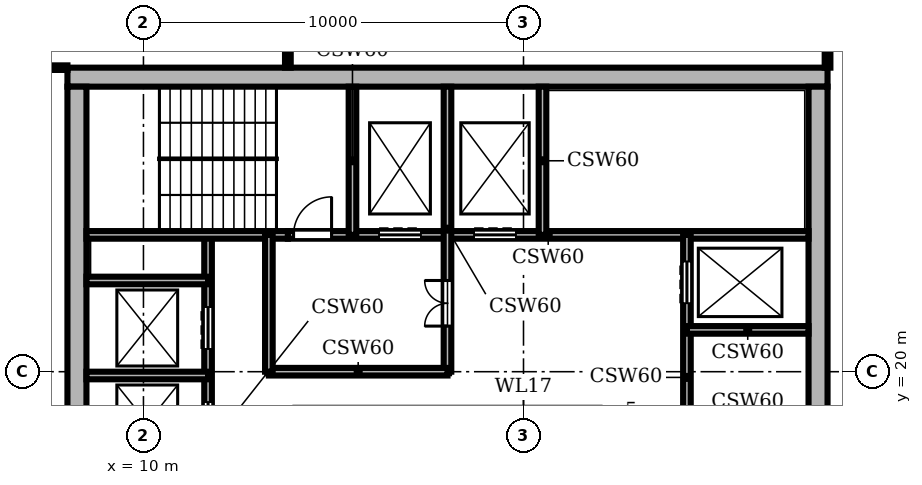
"""IFC4 building model, lengths in metres.
Left out: names, types, materials, properties, quantities, classifications, styles, units other than length and angle.
Written with IfcOpenShell. Run it as: python <this file> out.ifc"""

import sys

from ifc_helpers import new_model, si_unit, direction, frame, frame_2d, origin, place, context, subcontext, project, spatial, rectangle, extrude, element, fill, save


model = new_model("IFC4")
c1 = context("Model", 3, precision=1e-05, world=origin(), true_north=direction((0.0, 1.0)))
c2 = subcontext(c1, "Body", "Model", "MODEL_VIEW")
j1 = project(units=[si_unit("LENGTHUNIT", "METRE"), si_unit("PLANEANGLEUNIT", "RADIAN")], contexts=[c1])
p1 = place(None, origin())
s1 = spatial("IfcSite", under=j1, at=p1, CompositionType="ELEMENT")
p2 = place(p1, origin())
s2 = spatial("IfcBuilding", under=s1, at=p2, CompositionType="ELEMENT")
p3 = place(p2, frame((0.0, 0.0, 317.7)))
s3 = spatial("IfcBuildingStorey", under=s2, at=p3, CompositionType="ELEMENT", Elevation=317.7)
p4 = place(p3, frame((27.75, 8.5, 0.0), z_axis=(0.0, 0.0, 1.0), x_axis=(0.0, 1.0, 0.0)))
e1 = element("IfcWall", 1, at=p4, inside=s3, PredefinedType="SHEAR", context=c2, shape_type="SweptSolid", body=[
    extrude(rectangle(XDim=19.0, YDim=0.5, at=frame_2d((9.5, 0.0))), origin(), (0.0, 0.0, 1.0), 3.9),
])
p5 = place(p4, frame((4.95, 0.0, 0.0)))
e2 = element("IfcOpeningElement", 2, at=p5, cuts=e1, PredefinedType="OPENING", context=c2, shape_type="SweptSolid", body=[
    extrude(rectangle(XDim=1.6, YDim=2.1, at=frame_2d((0.8, 1.05))), frame((0.0, 0.26, 0.0), z_axis=(0.0, -1.0, 0.0), x_axis=(1.0, 0.0, 0.0)), (0.0, 0.0, 1.0), 0.52),
])
p6 = place(p3, frame((28.0, 27.75, 0.0), z_axis=(0.0, 0.0, 1.0), x_axis=(-1.0, 0.0, 0.0)))
e3 = element("IfcWall", 3, at=p6, inside=s3, PredefinedType="SHEAR", context=c2, shape_type="SweptSolid", body=[
    extrude(rectangle(XDim=20.0, YDim=0.5, at=frame_2d((10.0, 0.0))), origin(), (0.0, 0.0, 1.0), 3.9),
])
p7 = place(p3, frame((8.25, 27.5, 0.0), z_axis=(0.0, 0.0, 1.0), x_axis=(0.0, -1.0, 0.0)))
e4 = element("IfcWall", 4, at=p7, inside=s3, PredefinedType="SHEAR", context=c2, shape_type="SweptSolid", body=[
    extrude(rectangle(XDim=19.0, YDim=0.5, at=frame_2d((9.5, 0.0))), origin(), (0.0, 0.0, 1.0), 3.9),
])
p8 = place(p3, frame((8.5, 19.9, 0.0), z_axis=(0.0, 0.0, 1.0), x_axis=(1.0, 0.0, 0.0)))
e5 = element("IfcWall", 5, at=p8, inside=s3, PredefinedType="SHEAR", context=c2, shape_type="SweptSolid", body=[
    extrude(rectangle(XDim=3.2, YDim=0.2, at=frame_2d((1.6, 0.0))), origin(), (0.0, 0.0, 1.0), 3.58),
])
p9 = place(p3, frame((13.3, 20.0, 0.0), z_axis=(0.0, 0.0, 1.0), x_axis=(1.0, 0.0, 0.0)))
e6 = element("IfcWall", 6, at=p9, inside=s3, PredefinedType="SHEAR", context=c2, shape_type="SweptSolid", body=[
    extrude(rectangle(XDim=4.7, YDim=0.2, at=frame_2d((2.35, 0.0))), origin(), (0.0, 0.0, 1.0), 3.58),
])
for number, where, z_axis, x_axis in (
    (7, (24.3, 21.1, 0.0), (0.0, 0.0, 1.0), (1.0, 0.0, 0.0)),
    (8, (8.5, 22.4, 0.0), (0.0, 0.0, 1.0), (1.0, 0.0, 0.0)),
):
    element("IfcWall", number, at=place(p3, frame(where, z_axis=z_axis, x_axis=x_axis)), inside=s3, PredefinedType="SHEAR", context=c2, shape_type="SweptSolid", body=[
        extrude(rectangle(XDim=3.2, YDim=0.2, at=frame_2d((1.6, 0.0))), origin(), (0.0, 0.0, 1.0), 3.58),
    ])
p10 = place(p3, frame((8.5, 23.6, 0.0), z_axis=(0.0, 0.0, 1.0), x_axis=(1.0, 0.0, 0.0)))
e9 = element("IfcWall", 9, at=p10, inside=s3, PredefinedType="SHEAR", context=c2, shape_type="SweptSolid", body=[
    extrude(rectangle(XDim=5.3, YDim=0.2, at=frame_2d((2.65, 0.0))), origin(), (0.0, 0.0, 1.0), 3.58),
])
p11 = place(p3, frame((13.8, 23.6, 0.0), z_axis=(0.0, 0.0, 1.0), x_axis=(1.0, 0.0, 0.0)))
e10 = element("IfcWall", 10, at=p11, inside=s3, PredefinedType="SHEAR", context=c2, shape_type="SweptSolid", body=[
    extrude(rectangle(XDim=13.7, YDim=0.2, at=frame_2d((6.85, 0.0))), origin(), (0.0, 0.0, 1.0), 3.58),
])
p12 = place(p11, frame((2.4, 0.0, 0.0)))
e11 = element("IfcOpeningElement", 11, at=p12, cuts=e10, PredefinedType="OPENING", context=c2, shape_type="SweptSolid", body=[
    extrude(rectangle(XDim=1.1, YDim=2.1, at=frame_2d((0.55, 1.05))), frame((0.0, 0.11, 0.0), z_axis=(0.0, -1.0, 0.0), x_axis=(1.0, 0.0, 0.0)), (0.0, 0.0, 1.0), 0.22),
])
p13 = place(p11, frame((4.9, 0.0, 0.0)))
e12 = element("IfcOpeningElement", 12, at=p13, cuts=e10, PredefinedType="OPENING", context=c2, shape_type="SweptSolid", body=[
    extrude(rectangle(XDim=1.1, YDim=2.1, at=frame_2d((0.55, 1.05))), frame((0.0, 0.11, 0.0), z_axis=(0.0, -1.0, 0.0), x_axis=(1.0, 0.0, 0.0)), (0.0, 0.0, 1.0), 0.22),
])
p14 = place(p11, frame((0.15, 0.0, 0.0)))
e13 = element("IfcOpeningElement", 13, at=p14, cuts=e10, PredefinedType="OPENING", context=c2, shape_type="SweptSolid", body=[
    extrude(rectangle(XDim=1.0, YDim=2.1, at=frame_2d((0.5, 1.05))), frame((0.0, 0.11, 0.0), z_axis=(0.0, -1.0, 0.0), x_axis=(1.0, 0.0, 0.0)), (0.0, 0.0, 1.0), 0.22),
])
p15 = place(p3, frame((11.7, 12.4, 0.0), z_axis=(0.0, 0.0, 1.0), x_axis=(0.0, 1.0, 0.0)))
e14 = element("IfcWall", 14, at=p15, inside=s3, PredefinedType="SHEAR", context=c2, shape_type="SweptSolid", body=[
    extrude(rectangle(XDim=11.2, YDim=0.2, at=frame_2d((5.6, 0.0))), origin(), (0.0, 0.0, 1.0), 3.58),
])
p16 = place(p15, frame((0.7, 0.0, 0.0)))
e15 = element("IfcOpeningElement", 15, at=p16, cuts=e14, PredefinedType="OPENING", context=c2, shape_type="SweptSolid", body=[
    extrude(rectangle(XDim=1.1, YDim=2.1, at=frame_2d((0.55, 1.05))), frame((0.0, 0.11, 0.0), z_axis=(0.0, -1.0, 0.0), x_axis=(1.0, 0.0, 0.0)), (0.0, 0.0, 1.0), 0.22),
])
p17 = place(p15, frame((3.2, 0.0, 0.0)))
e16 = element("IfcOpeningElement", 16, at=p17, cuts=e14, PredefinedType="OPENING", context=c2, shape_type="SweptSolid", body=[
    extrude(rectangle(XDim=1.1, YDim=2.1, at=frame_2d((0.55, 1.05))), frame((0.0, 0.11, 0.0), z_axis=(0.0, -1.0, 0.0), x_axis=(1.0, 0.0, 0.0)), (0.0, 0.0, 1.0), 0.22),
])
p18 = place(p15, frame((5.7, 0.0, 0.0)))
e17 = element("IfcOpeningElement", 17, at=p18, cuts=e14, PredefinedType="OPENING", context=c2, shape_type="SweptSolid", body=[
    extrude(rectangle(XDim=1.1, YDim=2.1, at=frame_2d((0.55, 1.05))), frame((0.0, 0.11, 0.0), z_axis=(0.0, -1.0, 0.0), x_axis=(1.0, 0.0, 0.0)), (0.0, 0.0, 1.0), 0.22),
])
p19 = place(p15, frame((8.2, 0.0, 0.0)))
e18 = element("IfcOpeningElement", 18, at=p19, cuts=e14, PredefinedType="OPENING", context=c2, shape_type="SweptSolid", body=[
    extrude(rectangle(XDim=1.1, YDim=2.1, at=frame_2d((0.55, 1.05))), frame((0.0, 0.11, 0.0), z_axis=(0.0, -1.0, 0.0), x_axis=(1.0, 0.0, 0.0)), (0.0, 0.0, 1.0), 0.22),
])
p20 = place(p3, frame((13.3, 20.0, 0.0), z_axis=(0.0, 0.0, 1.0), x_axis=(0.0, 1.0, 0.0)))
e19 = element("IfcWall", 19, at=p20, inside=s3, PredefinedType="SHEAR", context=c2, shape_type="SweptSolid", body=[
    extrude(rectangle(XDim=3.6, YDim=0.2, at=frame_2d((1.8, 0.0))), origin(), (0.0, 0.0, 1.0), 3.58),
])
p21 = place(p3, frame((15.5, 23.6, 0.0), z_axis=(0.0, 0.0, 1.0), x_axis=(0.0, 1.0, 0.0)))
e20 = element("IfcWall", 20, at=p21, inside=s3, PredefinedType="SHEAR", context=c2, shape_type="SweptSolid", body=[
    extrude(rectangle(XDim=3.9, YDim=0.2, at=frame_2d((1.95, 0.0))), origin(), (0.0, 0.0, 1.0), 3.58),
])
p22 = place(p3, frame((18.0, 20.0, 0.0), z_axis=(0.0, 0.0, 1.0), x_axis=(0.0, 1.0, 0.0)))
e21 = element("IfcWall", 21, at=p22, inside=s3, PredefinedType="SHEAR", context=c2, shape_type="SweptSolid", body=[
    extrude(rectangle(XDim=7.5, YDim=0.2, at=frame_2d((3.75, 0.0))), origin(), (0.0, 0.0, 1.0), 3.58),
])
p23 = place(p22, frame((1.2, 0.0, 0.0)))
e22 = element("IfcOpeningElement", 22, at=p23, cuts=e21, PredefinedType="OPENING", context=c2, shape_type="SweptSolid", body=[
    extrude(rectangle(XDim=1.2, YDim=2.1, at=frame_2d((0.6, 1.05))), frame((0.0, 0.11, 0.0), z_axis=(0.0, -1.0, 0.0), x_axis=(1.0, 0.0, 0.0)), (0.0, 0.0, 1.0), 0.22),
])
p24 = place(p3, frame((20.5, 23.6, 0.0), z_axis=(0.0, 0.0, 1.0), x_axis=(0.0, 1.0, 0.0)))
e23 = element("IfcWall", 23, at=p24, inside=s3, PredefinedType="SHEAR", context=c2, shape_type="SweptSolid", body=[
    extrude(rectangle(XDim=3.9, YDim=0.2, at=frame_2d((1.95, 0.0))), origin(), (0.0, 0.0, 1.0), 3.58),
])
p25 = place(p3, frame((24.3, 16.1, 0.0), z_axis=(0.0, 0.0, 1.0), x_axis=(0.0, 1.0, 0.0)))
e24 = element("IfcWall", 24, at=p25, inside=s3, PredefinedType="SHEAR", context=c2, shape_type="SweptSolid", body=[
    extrude(rectangle(XDim=7.5, YDim=0.2, at=frame_2d((3.75, 0.0))), origin(), (0.0, 0.0, 1.0), 3.58),
])
p26 = place(p25, frame((5.7, 0.0, 0.0)))
e25 = element("IfcOpeningElement", 25, at=p26, cuts=e24, PredefinedType="OPENING", context=c2, shape_type="SweptSolid", body=[
    extrude(rectangle(XDim=1.1, YDim=2.1, at=frame_2d((0.55, 1.05))), frame((0.0, 0.11, 0.0), z_axis=(0.0, -1.0, 0.0), x_axis=(1.0, 0.0, 0.0)), (0.0, 0.0, 1.0), 0.22),
])
p27 = place(p3, frame((13.8, 28.0, 0.0), z_axis=(0.0, 0.0, 1.0), x_axis=(0.0, 1.0, 0.0)))
e26 = element("IfcWall", 26, at=p27, inside=s3, PredefinedType="PARTITIONING", context=c2, shape_type="SweptSolid", body=[
    extrude(rectangle(XDim=2.801, YDim=0.15, at=frame_2d((1.4, 0.0))), origin(), (0.0, 0.0, 1.0), 3.58),
])
p28 = place(p3, frame((28.0, 28.0, 0.0), z_axis=(0.0, 0.0, 1.0), x_axis=(0.0, 1.0, 0.0)))
e27 = element("IfcWall", 27, at=p28, inside=s3, PredefinedType="PARTITIONING", context=c2, shape_type="SweptSolid", body=[
    extrude(rectangle(XDim=2.598, YDim=0.15, at=frame_2d((1.299, 0.0))), origin(), (0.0, 0.0, 1.0), 3.58),
])
p29 = place(p3, frame((5.6, 28.0, 0.0), z_axis=(0.0, 0.0, 1.0), x_axis=(1.0, 0.0, 0.0)))
e28 = element("IfcWall", 28, at=p29, inside=s3, PredefinedType="PARTITIONING", context=c2, shape_type="SweptSolid", body=[
    extrude(rectangle(XDim=2.4, YDim=0.12, at=frame_2d((1.2, 0.0))), origin(), (0.0, 0.0, 1.0), 3.58),
])
p30 = place(p18, origin())
e29 = element("IfcDoor", 29, at=p30, inside=s3, OperationType="DOUBLE_DOOR_SLIDING", PredefinedType="DOOR", context=c2, shape_type="SweptSolid", body=[
    extrude(rectangle(XDim=1.1, YDim=2.1, at=frame_2d((0.55, 1.05))), frame((0.0, 0.025, 0.0), z_axis=(0.0, -1.0, 0.0), x_axis=(1.0, 0.0, 0.0)), (0.0, 0.0, 1.0), 0.05),
])
fill(e17, e29)
p31 = place(p19, origin())
e30 = element("IfcDoor", 30, at=p31, inside=s3, OperationType="DOUBLE_DOOR_SLIDING", PredefinedType="DOOR", context=c2, shape_type="SweptSolid", body=[
    extrude(rectangle(XDim=1.1, YDim=2.1, at=frame_2d((0.55, 1.05))), frame((0.0, 0.025, 0.0), z_axis=(0.0, -1.0, 0.0), x_axis=(1.0, 0.0, 0.0)), (0.0, 0.0, 1.0), 0.05),
])
fill(e18, e30)
p32 = place(p26, origin())
e31 = element("IfcDoor", 31, at=p32, inside=s3, OperationType="DOUBLE_DOOR_SLIDING", PredefinedType="DOOR", context=c2, shape_type="SweptSolid", body=[
    extrude(rectangle(XDim=1.1, YDim=2.1, at=frame_2d((0.55, 1.05))), frame((0.0, 0.025, 0.0), z_axis=(0.0, -1.0, 0.0), x_axis=(1.0, 0.0, 0.0)), (0.0, 0.0, 1.0), 0.05),
])
fill(e25, e31)
p33 = place(p12, origin())
e32 = element("IfcDoor", 32, at=p33, inside=s3, OperationType="DOUBLE_DOOR_SLIDING", PredefinedType="DOOR", context=c2, shape_type="SweptSolid", body=[
    extrude(rectangle(XDim=1.1, YDim=2.1, at=frame_2d((0.55, 1.05))), frame((0.0, 0.025, 0.0), z_axis=(0.0, -1.0, 0.0), x_axis=(1.0, 0.0, 0.0)), (0.0, 0.0, 1.0), 0.05),
])
fill(e11, e32)
p34 = place(p13, origin())
e33 = element("IfcDoor", 33, at=p34, inside=s3, OperationType="DOUBLE_DOOR_SLIDING", PredefinedType="DOOR", context=c2, shape_type="SweptSolid", body=[
    extrude(rectangle(XDim=1.1, YDim=2.1, at=frame_2d((0.55, 1.05))), frame((0.0, 0.025, 0.0), z_axis=(0.0, -1.0, 0.0), x_axis=(1.0, 0.0, 0.0)), (0.0, 0.0, 1.0), 0.05),
])
fill(e12, e33)
p35 = place(p14, origin())
e34 = element("IfcDoor", 34, at=p35, inside=s3, OperationType="SINGLE_SWING_RIGHT", PredefinedType="DOOR", context=c2, shape_type="SweptSolid", body=[
    extrude(rectangle(XDim=1.0, YDim=2.1, at=frame_2d((0.5, 1.05))), frame((0.0, 0.025, 0.0), z_axis=(0.0, -1.0, 0.0), x_axis=(1.0, 0.0, 0.0)), (0.0, 0.0, 1.0), 0.05),
])
fill(e13, e34)
p36 = place(p23, origin())
e35 = element("IfcDoor", 35, at=p36, inside=s3, OperationType="DOUBLE_DOOR_SINGLE_SWING", PredefinedType="DOOR", context=c2, shape_type="SweptSolid", body=[
    extrude(rectangle(XDim=1.2, YDim=2.1, at=frame_2d((0.6, 1.05))), frame((0.0, 0.025, 0.0), z_axis=(0.0, -1.0, 0.0), x_axis=(1.0, 0.0, 0.0)), (0.0, 0.0, 1.0), 0.05),
])
fill(e22, e35)
save(model, sys.argv[1])
